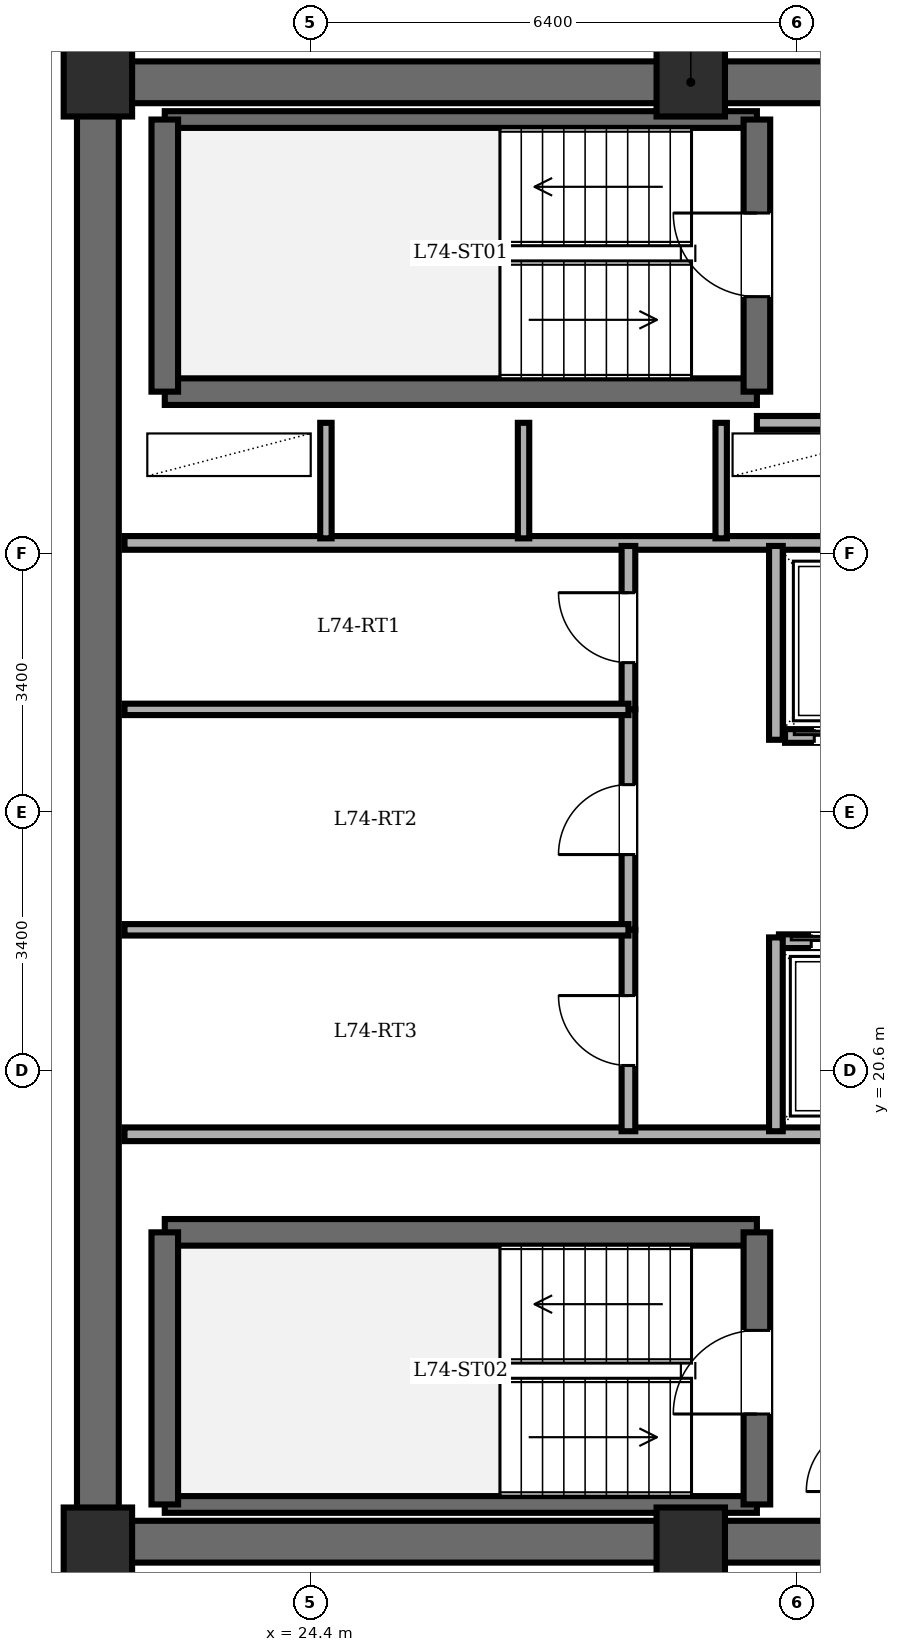
"""IFC4 building model, lengths in metres.
Left out: names, types, materials, properties, quantities, classifications, styles, units other than length and angle.
Written with IfcOpenShell. Run it as: python <this file> out.ifc"""

import sys

from ifc_helpers import new_model, si_unit, direction, frame, frame_2d, origin, origin_2d, place, context, subcontext, project, spatial, rectangle, extrude, element, fill, save


model = new_model("IFC4")
c1 = context("Model", 3, precision=1e-05, world=origin(), true_north=direction((0.0, 1.0)))
c2 = subcontext(c1, "Body", "Model", "MODEL_VIEW")
j1 = project(units=[si_unit("LENGTHUNIT", "METRE"), si_unit("PLANEANGLEUNIT", "RADIAN")], contexts=[c1])
p1 = place(None, origin())
s1 = spatial("IfcSite", under=j1, at=p1, CompositionType="ELEMENT")
p2 = place(p1, origin())
s2 = spatial("IfcBuilding", under=s1, at=p2, CompositionType="ELEMENT")
p3 = place(p2, frame((0.0, 0.0, 284.35)))
s3 = spatial("IfcBuildingStorey", under=s2, at=p3, CompositionType="ELEMENT", Elevation=284.35)
for number, where, z_axis, x_axis in (
    (1, (21.6, 14.4, 0.0), (0.0, 0.0, 1.0), (1.0, 0.0, 0.0)),
    (2, (29.4, 14.4, 0.0), (0.0, 0.0, 1.0), (1.0, 0.0, 0.0)),
    (3, (29.4, 33.6, 0.0), (0.0, 0.0, 1.0), (1.0, 0.0, 0.0)),
    (4, (21.6, 33.6, 0.0), (0.0, 0.0, 1.0), (1.0, 0.0, 0.0)),
):
    element("IfcColumn", number, at=place(p3, frame(where, z_axis=z_axis, x_axis=x_axis)), inside=s3, PredefinedType="COLUMN", context=c2, shape_type="SweptSolid", body=[
        extrude(rectangle(XDim=0.9, YDim=0.9, at=origin_2d()), origin(), (0.0, 0.0, 1.0), 3.65),
    ])
p4 = place(p3, frame((21.6, 14.4, 0.0), z_axis=(0.0, 0.0, 1.0), x_axis=(0.0, 1.0, 0.0)))
e5 = element("IfcWall", 5, at=p4, inside=s3, PredefinedType="SHEAR", context=c2, shape_type="SweptSolid", body=[
    extrude(rectangle(XDim=19.2, YDim=0.55, at=frame_2d((9.6, 0.0))), origin(), (0.0, 0.0, 1.0), 3.45),
])
for number, where, z_axis, x_axis in (
    (6, (21.6, 33.6, 0.0), (0.0, 0.0, 1.0), (1.0, 0.0, 0.0)),
    (7, (37.2, 14.4, 0.0), (0.0, 0.0, 1.0), (-1.0, 0.0, 0.0)),
):
    element("IfcWall", number, at=place(p3, frame(where, z_axis=z_axis, x_axis=x_axis)), inside=s3, PredefinedType="SHEAR", context=c2, shape_type="SweptSolid", body=[
        extrude(rectangle(XDim=15.6, YDim=0.55, at=frame_2d((7.8, 0.0))), origin(), (0.0, 0.0, 1.0), 3.45),
    ])
p5 = place(p3, frame((22.48, 29.53, 0.0), z_axis=(0.0, 0.0, 1.0), x_axis=(1.0, 0.0, 0.0)))
e8 = element("IfcWall", 8, at=p5, inside=s3, PredefinedType="SOLIDWALL", context=c2, shape_type="SweptSolid", body=[
    extrude(rectangle(XDim=7.79, YDim=0.35, at=frame_2d((3.895, 0.0))), origin(), (0.0, 0.0, 1.0), 3.45),
])
p6 = place(p3, frame((22.48, 33.11, 0.0), z_axis=(0.0, 0.0, 1.0), x_axis=(1.0, 0.0, 0.0)))
e9 = element("IfcWall", 9, at=p6, inside=s3, PredefinedType="PARTITIONING", context=c2, shape_type="SweptSolid", body=[
    extrude(rectangle(XDim=7.79, YDim=0.22, at=frame_2d((3.895, 0.0))), origin(), (0.0, 0.0, 1.0), 3.45),
])
p7 = place(p3, frame((22.48, 29.53, 0.0), z_axis=(0.0, 0.0, 1.0), x_axis=(0.0, 1.0, 0.0)))
e10 = element("IfcWall", 10, at=p7, inside=s3, PredefinedType="SOLIDWALL", context=c2, shape_type="SweptSolid", body=[
    extrude(rectangle(XDim=3.58, YDim=0.35, at=frame_2d((1.79, 0.0))), origin(), (0.0, 0.0, 1.0), 3.45),
])
p8 = place(p3, frame((30.27, 29.53, 0.0), z_axis=(0.0, 0.0, 1.0), x_axis=(0.0, 1.0, 0.0)))
e11 = element("IfcWall", 11, at=p8, inside=s3, PredefinedType="SOLIDWALL", context=c2, shape_type="SweptSolid", body=[
    extrude(rectangle(XDim=3.58, YDim=0.35, at=frame_2d((1.79, 0.0))), origin(), (0.0, 0.0, 1.0), 3.45),
])
p9 = place(p8, frame((1.25, 0.0, 0.0)))
e12 = element("IfcOpeningElement", 12, at=p9, cuts=e11, PredefinedType="OPENING", context=c2, shape_type="SweptSolid", body=[
    extrude(rectangle(XDim=1.1, YDim=2.15, at=frame_2d((0.55, 1.075))), frame((0.0, 0.185, 0.0), z_axis=(0.0, -1.0, 0.0), x_axis=(1.0, 0.0, 0.0)), (0.0, 0.0, 1.0), 0.37),
])
p10 = place(p3, frame((22.48, 18.47, 0.0), z_axis=(0.0, 0.0, 1.0), x_axis=(1.0, 0.0, 0.0)))
e13 = element("IfcWall", 13, at=p10, inside=s3, PredefinedType="SOLIDWALL", context=c2, shape_type="SweptSolid", body=[
    extrude(rectangle(XDim=7.79, YDim=0.35, at=frame_2d((3.895, 0.0))), origin(), (0.0, 0.0, 1.0), 3.45),
])
p11 = place(p3, frame((22.48, 14.89, 0.0), z_axis=(0.0, 0.0, 1.0), x_axis=(1.0, 0.0, 0.0)))
e14 = element("IfcWall", 14, at=p11, inside=s3, PredefinedType="PARTITIONING", context=c2, shape_type="SweptSolid", body=[
    extrude(rectangle(XDim=7.79, YDim=0.22, at=frame_2d((3.895, 0.0))), origin(), (0.0, 0.0, 1.0), 3.45),
])
p12 = place(p3, frame((22.48, 14.89, 0.0), z_axis=(0.0, 0.0, 1.0), x_axis=(0.0, 1.0, 0.0)))
e15 = element("IfcWall", 15, at=p12, inside=s3, PredefinedType="SOLIDWALL", context=c2, shape_type="SweptSolid", body=[
    extrude(rectangle(XDim=3.58, YDim=0.35, at=frame_2d((1.79, 0.0))), origin(), (0.0, 0.0, 1.0), 3.45),
])
p13 = place(p3, frame((30.27, 14.89, 0.0), z_axis=(0.0, 0.0, 1.0), x_axis=(0.0, 1.0, 0.0)))
e16 = element("IfcWall", 16, at=p13, inside=s3, PredefinedType="SOLIDWALL", context=c2, shape_type="SweptSolid", body=[
    extrude(rectangle(XDim=3.58, YDim=0.35, at=frame_2d((1.79, 0.0))), origin(), (0.0, 0.0, 1.0), 3.45),
])
p14 = place(p13, frame((1.19, 0.0, 0.0)))
e17 = element("IfcOpeningElement", 17, at=p14, cuts=e16, PredefinedType="OPENING", context=c2, shape_type="SweptSolid", body=[
    extrude(rectangle(XDim=1.1, YDim=2.15, at=frame_2d((0.55, 1.075))), frame((0.0, 0.185, 0.0), z_axis=(0.0, -1.0, 0.0), x_axis=(1.0, 0.0, 0.0)), (0.0, 0.0, 1.0), 0.37),
])
p15 = place(p3, frame((30.27, 29.12, 0.0), z_axis=(0.0, 0.0, 1.0), x_axis=(1.0, 0.0, 0.0)))
e18 = element("IfcWall", 18, at=p15, inside=s3, PredefinedType="PARTITIONING", context=c2, shape_type="SweptSolid", body=[
    extrude(rectangle(XDim=2.24, YDim=0.18, at=frame_2d((1.12, 0.0))), origin(), (0.0, 0.0, 1.0), 3.45),
])
p16 = place(p3, frame((21.95, 27.54, 0.0), z_axis=(0.0, 0.0, 1.0), x_axis=(1.0, 0.0, 0.0)))
e19 = element("IfcWall", 19, at=p16, inside=s3, PredefinedType="PARTITIONING", context=c2, shape_type="SweptSolid", body=[
    extrude(rectangle(XDim=10.56, YDim=0.18, at=frame_2d((5.28, 0.0))), origin(), (0.0, 0.0, 1.0), 3.45),
])
for number, where, z_axis, x_axis in (
    (20, (24.6, 27.6, 0.0), (0.0, 0.0, 1.0), (0.0, 1.0, 0.0)),
    (21, (27.2, 27.6, 0.0), (0.0, 0.0, 1.0), (0.0, 1.0, 0.0)),
    (22, (29.8, 27.6, 0.0), (0.0, 0.0, 1.0), (0.0, 1.0, 0.0)),
):
    element("IfcWall", number, at=place(p3, frame(where, z_axis=z_axis, x_axis=x_axis)), inside=s3, PredefinedType="PARTITIONING", context=c2, shape_type="SweptSolid", body=[
        extrude(rectangle(XDim=1.52, YDim=0.15, at=frame_2d((0.76, 0.0))), origin(), (0.0, 0.0, 1.0), 3.45),
    ])
p17 = place(p3, frame((21.95, 19.76, 0.0), z_axis=(0.0, 0.0, 1.0), x_axis=(1.0, 0.0, 0.0)))
e23 = element("IfcWall", 23, at=p17, inside=s3, PredefinedType="PARTITIONING", context=c2, shape_type="SweptSolid", body=[
    extrude(rectangle(XDim=14.87, YDim=0.18, at=frame_2d((7.435, 0.0))), origin(), (0.0, 0.0, 1.0), 3.45),
])
p18 = place(p3, frame((32.46, 25.0, 0.0), z_axis=(0.0, 0.0, 1.0), x_axis=(-1.0, 0.0, 0.0)))
e24 = element("IfcWall", 24, at=p18, inside=s3, PredefinedType="PARTITIONING", context=c2, shape_type="SweptSolid", body=[
    extrude(rectangle(XDim=1.82, YDim=0.18, at=frame_2d((0.91, 0.0))), origin(), (0.0, 0.0, 1.0), 3.45),
])
p19 = place(p18, frame((0.385, 0.0, 0.0)))
e25 = element("IfcOpeningElement", 25, at=p19, cuts=e24, PredefinedType="OPENING", context=c2, shape_type="SweptSolid", body=[
    extrude(rectangle(XDim=1.05, YDim=2.2, at=frame_2d((0.525, 1.1))), frame((0.0, 0.1, 0.0), z_axis=(0.0, -1.0, 0.0), x_axis=(1.0, 0.0, 0.0)), (0.0, 0.0, 1.0), 0.2),
])
p20 = place(p3, frame((30.56, 22.3, 0.0), z_axis=(0.0, 0.0, 1.0), x_axis=(1.0, 0.0, 0.0)))
e26 = element("IfcWall", 26, at=p20, inside=s3, PredefinedType="PARTITIONING", context=c2, shape_type="SweptSolid", body=[
    extrude(rectangle(XDim=1.9, YDim=0.18, at=frame_2d((0.95, 0.0))), origin(), (0.0, 0.0, 1.0), 3.45),
])
p21 = place(p20, frame((0.425, 0.0, 0.0)))
e27 = element("IfcOpeningElement", 27, at=p21, cuts=e26, PredefinedType="OPENING", context=c2, shape_type="SweptSolid", body=[
    extrude(rectangle(XDim=1.05, YDim=2.2, at=frame_2d((0.525, 1.1))), frame((0.0, 0.1, 0.0), z_axis=(0.0, -1.0, 0.0), x_axis=(1.0, 0.0, 0.0)), (0.0, 0.0, 1.0), 0.2),
])
for number, where, z_axis, x_axis in (
    (28, (30.52, 24.95, 0.0), (0.0, 0.0, 1.0), (0.0, 1.0, 0.0)),
    (29, (30.52, 19.8, 0.0), (0.0, 0.0, 1.0), (0.0, 1.0, 0.0)),
):
    element("IfcWall", number, at=place(p3, frame(where, z_axis=z_axis, x_axis=x_axis)), inside=s3, PredefinedType="PARTITIONING", context=c2, shape_type="SweptSolid", body=[
        extrude(rectangle(XDim=2.55, YDim=0.18, at=frame_2d((1.275, 0.0))), origin(), (0.0, 0.0, 1.0), 3.45),
    ])
p22 = place(p3, frame((28.58, 25.35, 0.0), z_axis=(0.0, 0.0, 1.0), x_axis=(0.0, 1.0, 0.0)))
e30 = element("IfcWall", 30, at=p22, inside=s3, PredefinedType="PARTITIONING", context=c2, shape_type="SweptSolid", body=[
    extrude(rectangle(XDim=2.15, YDim=0.18, at=frame_2d((1.075, 0.0))), origin(), (0.0, 0.0, 1.0), 3.45),
])
p23 = place(p22, frame((0.615, 0.0, 0.0)))
e31 = element("IfcOpeningElement", 31, at=p23, cuts=e30, PredefinedType="OPENING", context=c2, shape_type="SweptSolid", body=[
    extrude(rectangle(XDim=0.92, YDim=2.1, at=frame_2d((0.46, 1.05))), frame((0.0, 0.1, 0.0), z_axis=(0.0, -1.0, 0.0), x_axis=(1.0, 0.0, 0.0)), (0.0, 0.0, 1.0), 0.2),
])
p24 = place(p3, frame((28.58, 22.45, 0.0), z_axis=(0.0, 0.0, 1.0), x_axis=(0.0, 1.0, 0.0)))
e32 = element("IfcWall", 32, at=p24, inside=s3, PredefinedType="PARTITIONING", context=c2, shape_type="SweptSolid", body=[
    extrude(rectangle(XDim=2.9, YDim=0.18, at=frame_2d((1.45, 0.0))), origin(), (0.0, 0.0, 1.0), 3.45),
])
p25 = place(p24, frame((0.99, 0.0, 0.0)))
e33 = element("IfcOpeningElement", 33, at=p25, cuts=e32, PredefinedType="OPENING", context=c2, shape_type="SweptSolid", body=[
    extrude(rectangle(XDim=0.92, YDim=2.1, at=frame_2d((0.46, 1.05))), frame((0.0, 0.1, 0.0), z_axis=(0.0, -1.0, 0.0), x_axis=(1.0, 0.0, 0.0)), (0.0, 0.0, 1.0), 0.2),
])
p26 = place(p3, frame((28.58, 19.8, 0.0), z_axis=(0.0, 0.0, 1.0), x_axis=(0.0, 1.0, 0.0)))
e34 = element("IfcWall", 34, at=p26, inside=s3, PredefinedType="PARTITIONING", context=c2, shape_type="SweptSolid", body=[
    extrude(rectangle(XDim=2.65, YDim=0.18, at=frame_2d((1.325, 0.0))), origin(), (0.0, 0.0, 1.0), 3.45),
])
p27 = place(p26, frame((0.865, 0.0, 0.0)))
e35 = element("IfcOpeningElement", 35, at=p27, cuts=e34, PredefinedType="OPENING", context=c2, shape_type="SweptSolid", body=[
    extrude(rectangle(XDim=0.92, YDim=2.1, at=frame_2d((0.46, 1.05))), frame((0.0, 0.1, 0.0), z_axis=(0.0, -1.0, 0.0), x_axis=(1.0, 0.0, 0.0)), (0.0, 0.0, 1.0), 0.2),
])
for number, where, z_axis, x_axis in (
    (36, (21.95, 25.35, 0.0), (0.0, 0.0, 1.0), (1.0, 0.0, 0.0)),
    (37, (21.95, 22.45, 0.0), (0.0, 0.0, 1.0), (1.0, 0.0, 0.0)),
):
    element("IfcWall", number, at=place(p3, frame(where, z_axis=z_axis, x_axis=x_axis)), inside=s3, PredefinedType="PARTITIONING", context=c2, shape_type="SweptSolid", body=[
        extrude(rectangle(XDim=6.63, YDim=0.15, at=frame_2d((3.315, 0.0))), origin(), (0.0, 0.0, 1.0), 3.45),
    ])
p28 = place(p9, origin())
e38 = element("IfcDoor", 38, at=p28, inside=s3, OperationType="SINGLE_SWING_RIGHT", PredefinedType="DOOR", context=c2, shape_type="SweptSolid", body=[
    extrude(rectangle(XDim=1.1, YDim=2.15, at=frame_2d((0.55, 1.075))), frame((0.0, 0.025, 0.0), z_axis=(0.0, -1.0, 0.0), x_axis=(1.0, 0.0, 0.0)), (0.0, 0.0, 1.0), 0.05),
])
fill(e12, e38)
p29 = place(p14, origin())
e39 = element("IfcDoor", 39, at=p29, inside=s3, OperationType="SINGLE_SWING_LEFT", PredefinedType="DOOR", context=c2, shape_type="SweptSolid", body=[
    extrude(rectangle(XDim=1.1, YDim=2.15, at=frame_2d((0.55, 1.075))), frame((0.0, 0.025, 0.0), z_axis=(0.0, -1.0, 0.0), x_axis=(1.0, 0.0, 0.0)), (0.0, 0.0, 1.0), 0.05),
])
fill(e17, e39)
p30 = place(p19, origin())
e40 = element("IfcDoor", 40, at=p30, inside=s3, OperationType="DOUBLE_DOOR_SLIDING", PredefinedType="DOOR", context=c2, shape_type="SweptSolid", body=[
    extrude(rectangle(XDim=1.05, YDim=2.2, at=frame_2d((0.525, 1.1))), frame((0.0, 0.025, 0.0), z_axis=(0.0, -1.0, 0.0), x_axis=(1.0, 0.0, 0.0)), (0.0, 0.0, 1.0), 0.05),
])
fill(e25, e40)
p31 = place(p21, origin())
e41 = element("IfcDoor", 41, at=p31, inside=s3, OperationType="DOUBLE_DOOR_SLIDING", PredefinedType="DOOR", context=c2, shape_type="SweptSolid", body=[
    extrude(rectangle(XDim=1.05, YDim=2.2, at=frame_2d((0.525, 1.1))), frame((0.0, 0.025, 0.0), z_axis=(0.0, -1.0, 0.0), x_axis=(1.0, 0.0, 0.0)), (0.0, 0.0, 1.0), 0.05),
])
fill(e27, e41)
p32 = place(p23, origin())
e42 = element("IfcDoor", 42, at=p32, inside=s3, OperationType="SINGLE_SWING_RIGHT", PredefinedType="DOOR", context=c2, shape_type="SweptSolid", body=[
    extrude(rectangle(XDim=0.92, YDim=2.1, at=frame_2d((0.46, 1.05))), frame((0.0, 0.025, 0.0), z_axis=(0.0, -1.0, 0.0), x_axis=(1.0, 0.0, 0.0)), (0.0, 0.0, 1.0), 0.05),
])
fill(e31, e42)
p33 = place(p25, origin())
e43 = element("IfcDoor", 43, at=p33, inside=s3, OperationType="SINGLE_SWING_LEFT", PredefinedType="DOOR", context=c2, shape_type="SweptSolid", body=[
    extrude(rectangle(XDim=0.92, YDim=2.1, at=frame_2d((0.46, 1.05))), frame((0.0, 0.025, 0.0), z_axis=(0.0, -1.0, 0.0), x_axis=(1.0, 0.0, 0.0)), (0.0, 0.0, 1.0), 0.05),
])
fill(e33, e43)
p34 = place(p27, origin())
e44 = element("IfcDoor", 44, at=p34, inside=s3, OperationType="SINGLE_SWING_RIGHT", PredefinedType="DOOR", context=c2, shape_type="SweptSolid", body=[
    extrude(rectangle(XDim=0.92, YDim=2.1, at=frame_2d((0.46, 1.05))), frame((0.0, 0.025, 0.0), z_axis=(0.0, -1.0, 0.0), x_axis=(1.0, 0.0, 0.0)), (0.0, 0.0, 1.0), 0.05),
])
fill(e35, e44)
save(model, sys.argv[1])
